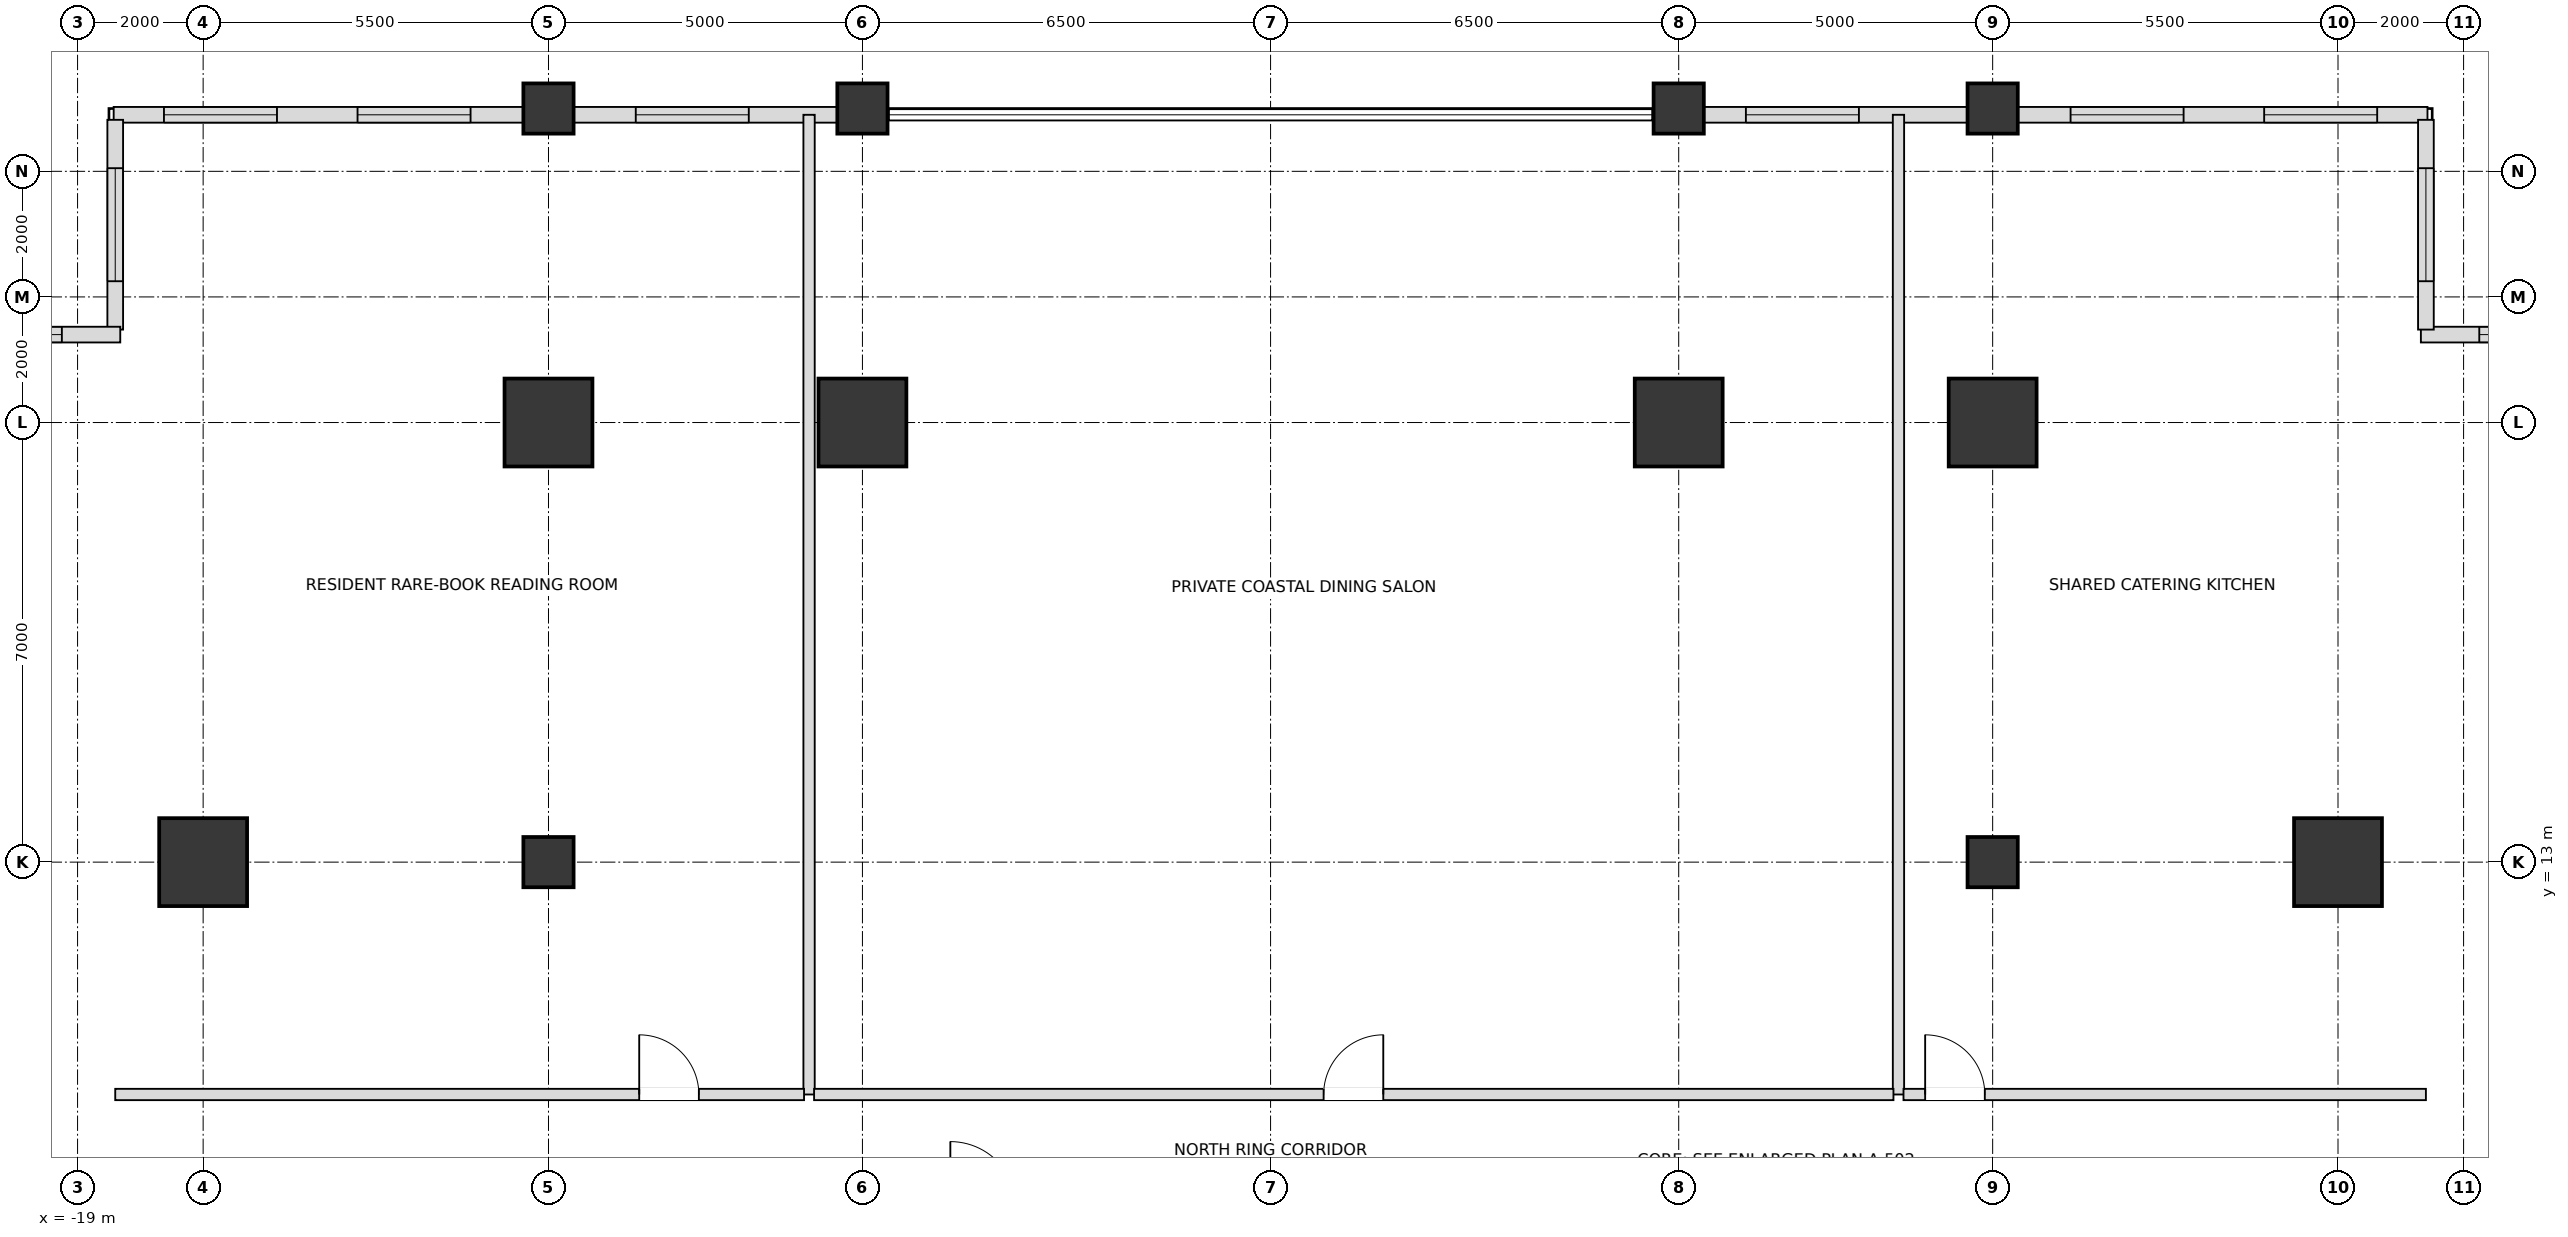
"""IFC4 building model, lengths in metres.
Left out: names, types, materials, properties, quantities, classifications, styles, units other than length and angle.
Written with IfcOpenShell. Run it as: python <this file> out.ifc"""

import sys

from ifc_helpers import new_model, si_unit, direction, frame, frame_2d, origin, origin_2d, place, context, subcontext, project, spatial, rectangle, extrude, element, fill, save


model = new_model("IFC4")
c1 = context("Model", 3, precision=1e-05, world=origin(), true_north=direction((0.0, 1.0)))
c2 = subcontext(c1, "Body", "Model", "MODEL_VIEW")
j1 = project(units=[si_unit("LENGTHUNIT", "METRE"), si_unit("PLANEANGLEUNIT", "RADIAN")], contexts=[c1])
p1 = place(None, origin())
s1 = spatial("IfcSite", under=j1, at=p1, CompositionType="ELEMENT")
p2 = place(p1, origin())
s2 = spatial("IfcBuilding", under=s1, at=p2, CompositionType="ELEMENT")
p3 = place(p2, frame((0.0, 0.0, 75.6)))
s3 = spatial("IfcBuildingStorey", under=s2, at=p3, CompositionType="ELEMENT", Elevation=75.6)
for number, where, z_axis, x_axis in (
    (1, (17.0, 13.0, 0.0), (0.0, 0.0, 1.0), (1.0, 0.0, 0.0)),
    (2, (11.5, 20.0, 0.0), (0.0, 0.0, 1.0), (1.0, 0.0, 0.0)),
    (3, (6.5, 20.0, 0.0), (0.0, 0.0, 1.0), (1.0, 0.0, 0.0)),
    (4, (-6.5, 20.0, 0.0), (0.0, 0.0, 1.0), (1.0, 0.0, 0.0)),
    (5, (-11.5, 20.0, 0.0), (0.0, 0.0, 1.0), (1.0, 0.0, 0.0)),
    (6, (-17.0, 13.0, 0.0), (0.0, 0.0, 1.0), (1.0, 0.0, 0.0)),
):
    element("IfcColumn", number, at=place(p3, frame(where, z_axis=z_axis, x_axis=x_axis)), inside=s3, PredefinedType="USERDEFINED", context=c2, shape_type="SweptSolid", body=[
        extrude(rectangle(XDim=1.4, YDim=1.4, at=origin_2d()), origin(), (0.0, 0.0, 1.0), 3.6),
    ])
for number, where, z_axis, x_axis in (
    (7, (-11.5, 13.0, 0.0), (0.0, 0.0, 1.0), (1.0, 0.0, 0.0)),
    (8, (11.5, 13.0, 0.0), (0.0, 0.0, 1.0), (1.0, 0.0, 0.0)),
    (9, (-11.5, 25.0, 0.0), (0.0, 0.0, 1.0), (1.0, 0.0, 0.0)),
    (10, (-6.5, 25.0, 0.0), (0.0, 0.0, 1.0), (1.0, 0.0, 0.0)),
    (11, (6.5, 25.0, 0.0), (0.0, 0.0, 1.0), (1.0, 0.0, 0.0)),
    (12, (11.5, 25.0, 0.0), (0.0, 0.0, 1.0), (1.0, 0.0, 0.0)),
):
    element("IfcColumn", number, at=place(p3, frame(where, z_axis=z_axis, x_axis=x_axis)), inside=s3, PredefinedType="COLUMN", context=c2, shape_type="SweptSolid", body=[
        extrude(rectangle(XDim=0.8, YDim=0.8, at=origin_2d()), origin(), (0.0, 0.0, 1.0), 3.6),
    ])
p4 = place(p3, frame((18.425, 24.9, 0.0), z_axis=(0.0, 0.0, 1.0), x_axis=(-1.0, 0.0, 0.0)))
e13 = element("IfcWall", 13, at=p4, inside=s3, PredefinedType="SOLIDWALL", context=c2, shape_type="SweptSolid", body=[
    extrude(rectangle(XDim=6.53, YDim=0.25, at=frame_2d((3.265, 0.0))), origin(), (0.0, 0.0, 1.0), 2.736),
])
p5 = place(p4, frame((0.801, 0.0, 0.72)))
e14 = element("IfcOpeningElement", 14, at=p5, cuts=e13, PredefinedType="OPENING", context=c2, shape_type="SweptSolid", body=[
    extrude(rectangle(XDim=1.8, YDim=1.68, at=frame_2d((0.9, 0.84))), frame((0.0, 0.135, 0.0), z_axis=(0.0, -1.0, 0.0), x_axis=(1.0, 0.0, 0.0)), (0.0, 0.0, 1.0), 0.27),
])
p6 = place(p4, frame((3.884, 0.0, 0.72)))
e15 = element("IfcOpeningElement", 15, at=p6, cuts=e13, PredefinedType="OPENING", context=c2, shape_type="SweptSolid", body=[
    extrude(rectangle(XDim=1.8, YDim=1.68, at=frame_2d((0.9, 0.84))), frame((0.0, 0.135, 0.0), z_axis=(0.0, -1.0, 0.0), x_axis=(1.0, 0.0, 0.0)), (0.0, 0.0, 1.0), 0.27),
])
p7 = place(p3, frame((11.105, 24.9, 0.0), z_axis=(0.0, 0.0, 1.0), x_axis=(-1.0, 0.0, 0.0)))
e16 = element("IfcWall", 16, at=p7, inside=s3, PredefinedType="SOLIDWALL", context=c2, shape_type="SweptSolid", body=[
    extrude(rectangle(XDim=4.21, YDim=0.25, at=frame_2d((2.105, 0.0))), origin(), (0.0, 0.0, 1.0), 2.736),
])
p8 = place(p7, frame((1.735, 0.0, 0.72)))
e17 = element("IfcOpeningElement", 17, at=p8, cuts=e16, PredefinedType="OPENING", context=c2, shape_type="SweptSolid", body=[
    extrude(rectangle(XDim=1.8, YDim=1.68, at=frame_2d((0.9, 0.84))), frame((0.0, 0.135, 0.0), z_axis=(0.0, -1.0, 0.0), x_axis=(1.0, 0.0, 0.0)), (0.0, 0.0, 1.0), 0.27),
])
p9 = place(p3, frame((-6.895, 24.9, 0.0), z_axis=(0.0, 0.0, 1.0), x_axis=(-1.0, 0.0, 0.0)))
e18 = element("IfcWall", 18, at=p9, inside=s3, PredefinedType="SOLIDWALL", context=c2, shape_type="SweptSolid", body=[
    extrude(rectangle(XDim=4.21, YDim=0.25, at=frame_2d((2.105, 0.0))), origin(), (0.0, 0.0, 1.0), 2.736),
])
p10 = place(p9, frame((1.415, 0.0, 0.72)))
e19 = element("IfcOpeningElement", 19, at=p10, cuts=e18, PredefinedType="OPENING", context=c2, shape_type="SweptSolid", body=[
    extrude(rectangle(XDim=1.8, YDim=1.68, at=frame_2d((0.9, 0.84))), frame((0.0, 0.135, 0.0), z_axis=(0.0, -1.0, 0.0), x_axis=(1.0, 0.0, 0.0)), (0.0, 0.0, 1.0), 0.27),
])
p11 = place(p3, frame((-11.895, 24.9, 0.0), z_axis=(0.0, 0.0, 1.0), x_axis=(-1.0, 0.0, 0.0)))
e20 = element("IfcWall", 20, at=p11, inside=s3, PredefinedType="SOLIDWALL", context=c2, shape_type="SweptSolid", body=[
    extrude(rectangle(XDim=6.53, YDim=0.25, at=frame_2d((3.265, 0.0))), origin(), (0.0, 0.0, 1.0), 2.736),
])
p12 = place(p11, frame((0.846, 0.0, 0.72)))
e21 = element("IfcOpeningElement", 21, at=p12, cuts=e20, PredefinedType="OPENING", context=c2, shape_type="SweptSolid", body=[
    extrude(rectangle(XDim=1.8, YDim=1.68, at=frame_2d((0.9, 0.84))), frame((0.0, 0.135, 0.0), z_axis=(0.0, -1.0, 0.0), x_axis=(1.0, 0.0, 0.0)), (0.0, 0.0, 1.0), 0.27),
])
p13 = place(p11, frame((3.929, 0.0, 0.72)))
e22 = element("IfcOpeningElement", 22, at=p13, cuts=e20, PredefinedType="OPENING", context=c2, shape_type="SweptSolid", body=[
    extrude(rectangle(XDim=1.8, YDim=1.68, at=frame_2d((0.9, 0.84))), frame((0.0, 0.135, 0.0), z_axis=(0.0, -1.0, 0.0), x_axis=(1.0, 0.0, 0.0)), (0.0, 0.0, 1.0), 0.27),
])
p14 = place(p3, frame((21.98, 21.4, 0.0), z_axis=(0.0, 0.0, 1.0), x_axis=(-1.0, 0.0, 0.0)))
e23 = element("IfcWall", 23, at=p14, inside=s3, PredefinedType="SOLIDWALL", context=c2, shape_type="SweptSolid", body=[
    extrude(rectangle(XDim=3.66, YDim=0.25, at=frame_2d((1.83, 0.0))), origin(), (0.0, 0.0, 1.0), 2.736),
])
p15 = place(p14, frame((0.93, 0.0, 0.72)))
e24 = element("IfcOpeningElement", 24, at=p15, cuts=e23, PredefinedType="OPENING", context=c2, shape_type="SweptSolid", body=[
    extrude(rectangle(XDim=1.8, YDim=1.68, at=frame_2d((0.9, 0.84))), frame((0.0, 0.135, 0.0), z_axis=(0.0, -1.0, 0.0), x_axis=(1.0, 0.0, 0.0)), (0.0, 0.0, 1.0), 0.27),
])
p16 = place(p3, frame((18.4, 21.48, 0.0), z_axis=(0.0, 0.0, 1.0), x_axis=(0.0, 1.0, 0.0)))
e25 = element("IfcWall", 25, at=p16, inside=s3, PredefinedType="SOLIDWALL", context=c2, shape_type="SweptSolid", body=[
    extrude(rectangle(XDim=3.34, YDim=0.25, at=frame_2d((1.67, 0.0))), origin(), (0.0, 0.0, 1.0), 2.736),
])
p17 = place(p16, frame((0.77, 0.0, 0.72)))
e26 = element("IfcOpeningElement", 26, at=p17, cuts=e25, PredefinedType="OPENING", context=c2, shape_type="SweptSolid", body=[
    extrude(rectangle(XDim=1.8, YDim=1.68, at=frame_2d((0.9, 0.84))), frame((0.0, 0.135, 0.0), z_axis=(0.0, -1.0, 0.0), x_axis=(1.0, 0.0, 0.0)), (0.0, 0.0, 1.0), 0.27),
])
p18 = place(p3, frame((-18.4, 24.82, 0.0), z_axis=(0.0, 0.0, 1.0), x_axis=(0.0, -1.0, 0.0)))
e27 = element("IfcWall", 27, at=p18, inside=s3, PredefinedType="SOLIDWALL", context=c2, shape_type="SweptSolid", body=[
    extrude(rectangle(XDim=3.34, YDim=0.25, at=frame_2d((1.67, 0.0))), origin(), (0.0, 0.0, 1.0), 2.736),
])
p19 = place(p18, frame((0.77, 0.0, 0.72)))
e28 = element("IfcOpeningElement", 28, at=p19, cuts=e27, PredefinedType="OPENING", context=c2, shape_type="SweptSolid", body=[
    extrude(rectangle(XDim=1.8, YDim=1.68, at=frame_2d((0.9, 0.84))), frame((0.0, 0.135, 0.0), z_axis=(0.0, -1.0, 0.0), x_axis=(1.0, 0.0, 0.0)), (0.0, 0.0, 1.0), 0.27),
])
p20 = place(p3, frame((-18.32, 21.4, 0.0), z_axis=(0.0, 0.0, 1.0), x_axis=(-1.0, 0.0, 0.0)))
e29 = element("IfcWall", 29, at=p20, inside=s3, PredefinedType="SOLIDWALL", context=c2, shape_type="SweptSolid", body=[
    extrude(rectangle(XDim=3.66, YDim=0.25, at=frame_2d((1.83, 0.0))), origin(), (0.0, 0.0, 1.0), 2.736),
])
p21 = place(p20, frame((0.93, 0.0, 0.72)))
e30 = element("IfcOpeningElement", 30, at=p21, cuts=e29, PredefinedType="OPENING", context=c2, shape_type="SweptSolid", body=[
    extrude(rectangle(XDim=1.8, YDim=1.68, at=frame_2d((0.9, 0.84))), frame((0.0, 0.135, 0.0), z_axis=(0.0, -1.0, 0.0), x_axis=(1.0, 0.0, 0.0)), (0.0, 0.0, 1.0), 0.27),
])
for number, where, z_axis, x_axis in (
    (31, (-7.35, 9.3, 0.0), (0.0, 0.0, 1.0), (0.0, 1.0, 0.0)),
    (32, (10.0, 9.3, 0.0), (0.0, 0.0, 1.0), (0.0, 1.0, 0.0)),
):
    element("IfcWall", number, at=place(p3, frame(where, z_axis=z_axis, x_axis=x_axis)), inside=s3, PredefinedType="PARTITIONING", context=c2, shape_type="SweptSolid", body=[
        extrude(rectangle(XDim=15.6, YDim=0.18, at=frame_2d((7.8, 0.0))), origin(), (0.0, 0.0, 1.0), 2.816),
    ])
p22 = place(p3, frame((-18.4, 9.3, 0.0), z_axis=(0.0, 0.0, 1.0), x_axis=(1.0, 0.0, 0.0)))
e33 = element("IfcWall", 33, at=p22, inside=s3, PredefinedType="PARTITIONING", context=c2, shape_type="SweptSolid", body=[
    extrude(rectangle(XDim=10.97, YDim=0.18, at=frame_2d((5.485, 0.0))), origin(), (0.0, 0.0, 1.0), 2.816),
])
p23 = place(p22, frame((8.345, 0.0, 0.0)))
e34 = element("IfcOpeningElement", 34, at=p23, cuts=e33, PredefinedType="OPENING", context=c2, shape_type="SweptSolid", body=[
    extrude(rectangle(XDim=0.95, YDim=2.15, at=frame_2d((0.475, 1.075))), frame((0.0, 0.1, 0.0), z_axis=(0.0, -1.0, 0.0), x_axis=(1.0, 0.0, 0.0)), (0.0, 0.0, 1.0), 0.2),
])
p24 = place(p3, frame((-7.27, 9.3, 0.0), z_axis=(0.0, 0.0, 1.0), x_axis=(1.0, 0.0, 0.0)))
e35 = element("IfcWall", 35, at=p24, inside=s3, PredefinedType="PARTITIONING", context=c2, shape_type="SweptSolid", body=[
    extrude(rectangle(XDim=17.19, YDim=0.18, at=frame_2d((8.595, 0.0))), origin(), (0.0, 0.0, 1.0), 2.816),
])
p25 = place(p24, frame((8.115, 0.0, 0.0)))
e36 = element("IfcOpeningElement", 36, at=p25, cuts=e35, PredefinedType="OPENING", context=c2, shape_type="SweptSolid", body=[
    extrude(rectangle(XDim=0.95, YDim=2.15, at=frame_2d((0.475, 1.075))), frame((0.0, 0.1, 0.0), z_axis=(0.0, -1.0, 0.0), x_axis=(1.0, 0.0, 0.0)), (0.0, 0.0, 1.0), 0.2),
])
p26 = place(p3, frame((10.08, 9.3, 0.0), z_axis=(0.0, 0.0, 1.0), x_axis=(1.0, 0.0, 0.0)))
e37 = element("IfcWall", 37, at=p26, inside=s3, PredefinedType="PARTITIONING", context=c2, shape_type="SweptSolid", body=[
    extrude(rectangle(XDim=8.32, YDim=0.18, at=frame_2d((4.16, 0.0))), origin(), (0.0, 0.0, 1.0), 2.816),
])
p27 = place(p26, frame((0.345, 0.0, 0.0)))
e38 = element("IfcOpeningElement", 38, at=p27, cuts=e37, PredefinedType="OPENING", context=c2, shape_type="SweptSolid", body=[
    extrude(rectangle(XDim=0.95, YDim=2.15, at=frame_2d((0.475, 1.075))), frame((0.0, 0.1, 0.0), z_axis=(0.0, -1.0, 0.0), x_axis=(1.0, 0.0, 0.0)), (0.0, 0.0, 1.0), 0.2),
])
p28 = place(p5, origin())
e39 = element("IfcWindow", 39, at=p28, inside=s3, PartitioningType="SINGLE_PANEL", PredefinedType="WINDOW", context=c2, shape_type="SweptSolid", body=[
    extrude(rectangle(XDim=1.8, YDim=1.68, at=frame_2d((0.9, 0.84))), frame((0.0, 0.03, 0.0), z_axis=(0.0, -1.0, 0.0), x_axis=(1.0, 0.0, 0.0)), (0.0, 0.0, 1.0), 0.06),
])
fill(e14, e39)
p29 = place(p6, origin())
e40 = element("IfcWindow", 40, at=p29, inside=s3, PartitioningType="SINGLE_PANEL", PredefinedType="WINDOW", context=c2, shape_type="SweptSolid", body=[
    extrude(rectangle(XDim=1.8, YDim=1.68, at=frame_2d((0.9, 0.84))), frame((0.0, 0.03, 0.0), z_axis=(0.0, -1.0, 0.0), x_axis=(1.0, 0.0, 0.0)), (0.0, 0.0, 1.0), 0.06),
])
fill(e15, e40)
p30 = place(p8, origin())
e41 = element("IfcWindow", 41, at=p30, inside=s3, PartitioningType="SINGLE_PANEL", PredefinedType="WINDOW", context=c2, shape_type="SweptSolid", body=[
    extrude(rectangle(XDim=1.8, YDim=1.68, at=frame_2d((0.9, 0.84))), frame((0.0, 0.03, 0.0), z_axis=(0.0, -1.0, 0.0), x_axis=(1.0, 0.0, 0.0)), (0.0, 0.0, 1.0), 0.06),
])
fill(e17, e41)
p31 = place(p10, origin())
e42 = element("IfcWindow", 42, at=p31, inside=s3, PartitioningType="SINGLE_PANEL", PredefinedType="WINDOW", context=c2, shape_type="SweptSolid", body=[
    extrude(rectangle(XDim=1.8, YDim=1.68, at=frame_2d((0.9, 0.84))), frame((0.0, 0.03, 0.0), z_axis=(0.0, -1.0, 0.0), x_axis=(1.0, 0.0, 0.0)), (0.0, 0.0, 1.0), 0.06),
])
fill(e19, e42)
p32 = place(p12, origin())
e43 = element("IfcWindow", 43, at=p32, inside=s3, PartitioningType="SINGLE_PANEL", PredefinedType="WINDOW", context=c2, shape_type="SweptSolid", body=[
    extrude(rectangle(XDim=1.8, YDim=1.68, at=frame_2d((0.9, 0.84))), frame((0.0, 0.03, 0.0), z_axis=(0.0, -1.0, 0.0), x_axis=(1.0, 0.0, 0.0)), (0.0, 0.0, 1.0), 0.06),
])
fill(e21, e43)
p33 = place(p13, origin())
e44 = element("IfcWindow", 44, at=p33, inside=s3, PartitioningType="SINGLE_PANEL", PredefinedType="WINDOW", context=c2, shape_type="SweptSolid", body=[
    extrude(rectangle(XDim=1.8, YDim=1.68, at=frame_2d((0.9, 0.84))), frame((0.0, 0.03, 0.0), z_axis=(0.0, -1.0, 0.0), x_axis=(1.0, 0.0, 0.0)), (0.0, 0.0, 1.0), 0.06),
])
fill(e22, e44)
p34 = place(p15, origin())
e45 = element("IfcWindow", 45, at=p34, inside=s3, PartitioningType="SINGLE_PANEL", PredefinedType="WINDOW", context=c2, shape_type="SweptSolid", body=[
    extrude(rectangle(XDim=1.8, YDim=1.68, at=frame_2d((0.9, 0.84))), frame((0.0, 0.03, 0.0), z_axis=(0.0, -1.0, 0.0), x_axis=(1.0, 0.0, 0.0)), (0.0, 0.0, 1.0), 0.06),
])
fill(e24, e45)
p35 = place(p17, origin())
e46 = element("IfcWindow", 46, at=p35, inside=s3, PartitioningType="SINGLE_PANEL", PredefinedType="WINDOW", context=c2, shape_type="SweptSolid", body=[
    extrude(rectangle(XDim=1.8, YDim=1.68, at=frame_2d((0.9, 0.84))), frame((0.0, 0.03, 0.0), z_axis=(0.0, -1.0, 0.0), x_axis=(1.0, 0.0, 0.0)), (0.0, 0.0, 1.0), 0.06),
])
fill(e26, e46)
p36 = place(p19, origin())
e47 = element("IfcWindow", 47, at=p36, inside=s3, PartitioningType="SINGLE_PANEL", PredefinedType="WINDOW", context=c2, shape_type="SweptSolid", body=[
    extrude(rectangle(XDim=1.8, YDim=1.68, at=frame_2d((0.9, 0.84))), frame((0.0, 0.03, 0.0), z_axis=(0.0, -1.0, 0.0), x_axis=(1.0, 0.0, 0.0)), (0.0, 0.0, 1.0), 0.06),
])
fill(e28, e47)
p37 = place(p21, origin())
e48 = element("IfcWindow", 48, at=p37, inside=s3, PartitioningType="SINGLE_PANEL", PredefinedType="WINDOW", context=c2, shape_type="SweptSolid", body=[
    extrude(rectangle(XDim=1.8, YDim=1.68, at=frame_2d((0.9, 0.84))), frame((0.0, 0.03, 0.0), z_axis=(0.0, -1.0, 0.0), x_axis=(1.0, 0.0, 0.0)), (0.0, 0.0, 1.0), 0.06),
])
fill(e30, e48)
p38 = place(p23, origin())
e49 = element("IfcDoor", 49, at=p38, inside=s3, OperationType="SINGLE_SWING_LEFT", PredefinedType="DOOR", context=c2, shape_type="SweptSolid", body=[
    extrude(rectangle(XDim=0.95, YDim=2.15, at=frame_2d((0.475, 1.075))), frame((0.0, 0.025, 0.0), z_axis=(0.0, -1.0, 0.0), x_axis=(1.0, 0.0, 0.0)), (0.0, 0.0, 1.0), 0.05),
])
fill(e34, e49)
p39 = place(p25, origin())
e50 = element("IfcDoor", 50, at=p39, inside=s3, OperationType="SINGLE_SWING_RIGHT", PredefinedType="DOOR", context=c2, shape_type="SweptSolid", body=[
    extrude(rectangle(XDim=0.95, YDim=2.15, at=frame_2d((0.475, 1.075))), frame((0.0, 0.025, 0.0), z_axis=(0.0, -1.0, 0.0), x_axis=(1.0, 0.0, 0.0)), (0.0, 0.0, 1.0), 0.05),
])
fill(e36, e50)
p40 = place(p27, origin())
e51 = element("IfcDoor", 51, at=p40, inside=s3, OperationType="SINGLE_SWING_LEFT", PredefinedType="DOOR", context=c2, shape_type="SweptSolid", body=[
    extrude(rectangle(XDim=0.95, YDim=2.15, at=frame_2d((0.475, 1.075))), frame((0.0, 0.025, 0.0), z_axis=(0.0, -1.0, 0.0), x_axis=(1.0, 0.0, 0.0)), (0.0, 0.0, 1.0), 0.05),
])
fill(e38, e51)
save(model, sys.argv[1])
